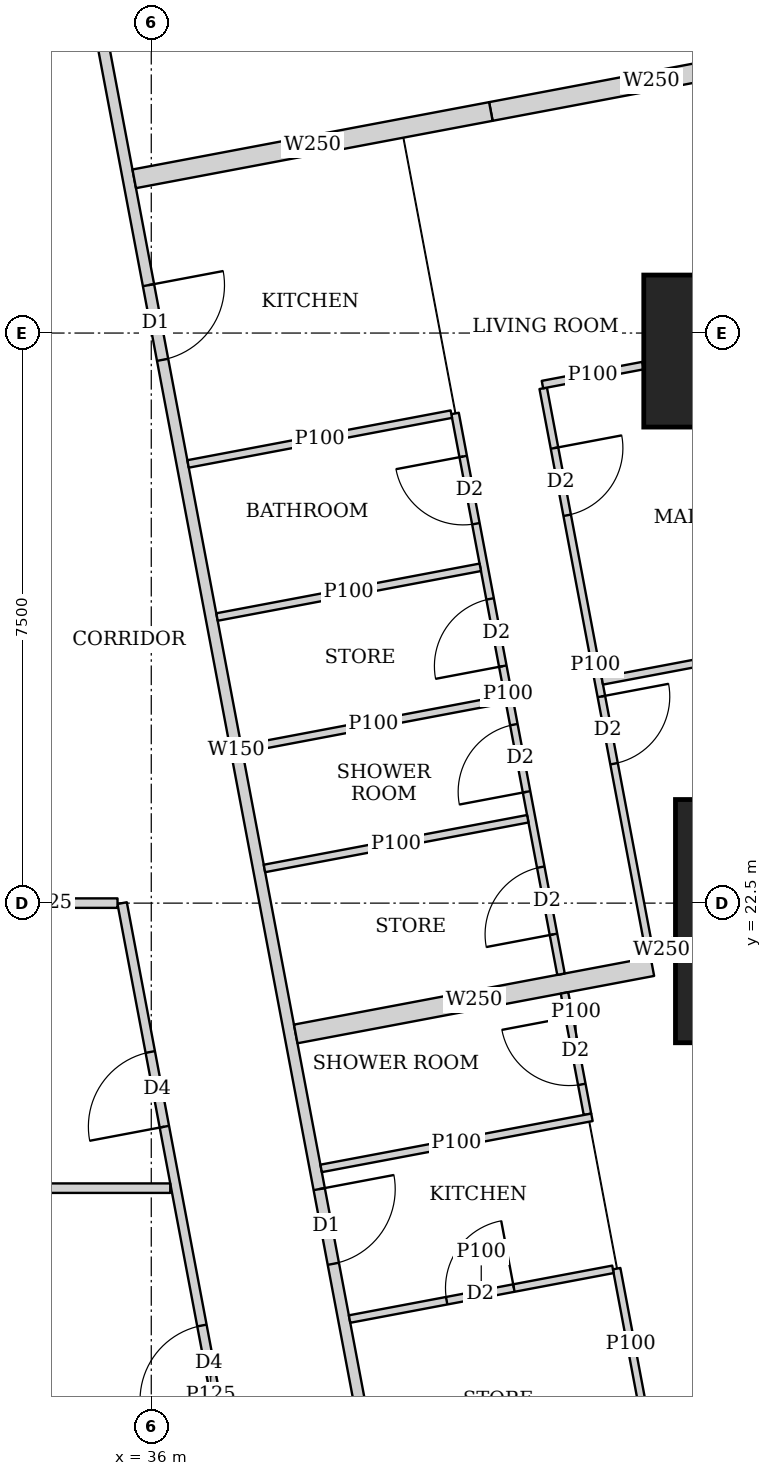
"""IFC4 building model, lengths in metres.
Left out: names, types, materials, properties, quantities, classifications, styles, units other than length and angle.
Written with IfcOpenShell. Run it as: python <this file> out.ifc"""

import sys

from ifc_helpers import new_model, si_unit, direction, frame, frame_2d, origin, origin_2d, place, context, subcontext, project, spatial, rectangle, extrude, element, fill, save


model = new_model("IFC4")
c1 = context("Model", 3, precision=1e-05, world=origin(), true_north=direction((0.0, 1.0)))
c2 = subcontext(c1, "Body", "Model", "MODEL_VIEW")
j1 = project(units=[si_unit("LENGTHUNIT", "METRE"), si_unit("PLANEANGLEUNIT", "RADIAN")], contexts=[c1])
p1 = place(None, origin())
s1 = spatial("IfcSite", under=j1, at=p1, CompositionType="ELEMENT")
p2 = place(p1, origin())
s2 = spatial("IfcBuilding", under=s1, at=p2, CompositionType="ELEMENT")
p3 = place(p2, frame((0.0, 0.0, 255.35)))
s3 = spatial("IfcBuildingStorey", under=s2, at=p3, CompositionType="ELEMENT", Elevation=255.35)
p4 = place(p3, frame((44.697, 22.263, 0.0), z_axis=(0.0, 0.0, 1.0), x_axis=(1.0, 0.0, 0.0)))
e1 = element("IfcColumn", 1, at=p4, inside=s3, PredefinedType="COLUMN", context=c2, shape_type="SweptSolid", body=[
    extrude(rectangle(XDim=3.6, YDim=3.2, at=origin_2d()), origin(), (0.0, 0.0, 1.0), 3.75),
])
p5 = place(p3, frame((43.48, 29.763, 0.0), z_axis=(0.0, 0.0, 1.0), x_axis=(1.0, 0.0, 0.0)))
e2 = element("IfcColumn", 2, at=p5, inside=s3, PredefinedType="COLUMN", context=c2, shape_type="SweptSolid", body=[
    extrude(rectangle(XDim=2.0, YDim=2.0, at=origin_2d()), origin(), (0.0, 0.0, 1.0), 3.75),
])
p6 = place(p3, frame((49.684, 7.832, 0.0), z_axis=(0.0, 0.0, 1.0), x_axis=(-0.185616669694, 0.982622232565, 0.0)))
e3 = element("IfcWall", 3, at=p6, inside=s3, PredefinedType="SOLIDWALL", context=c2, shape_type="SweptSolid", body=[
    extrude(rectangle(XDim=36.0, YDim=0.2, at=frame_2d((18.0, 0.0))), origin(), (0.0, 0.0, 1.0), 3.5),
])
p7 = place(p6, frame((2.518, 0.0, 0.9)))
e4 = element("IfcOpeningElement", 4, at=p7, cuts=e3, PredefinedType="OPENING", context=c2, shape_type="SweptSolid", body=[
    extrude(rectangle(XDim=2.4, YDim=1.5, at=frame_2d((1.2, 0.75))), frame((0.0, 0.11, 0.0), z_axis=(0.0, -1.0, 0.0), x_axis=(1.0, 0.0, 0.0)), (0.0, 0.0, 1.0), 0.22),
])
p8 = place(p6, frame((8.444, 0.0, 0.9)))
e5 = element("IfcOpeningElement", 5, at=p8, cuts=e3, PredefinedType="OPENING", context=c2, shape_type="SweptSolid", body=[
    extrude(rectangle(XDim=1.8, YDim=1.5, at=frame_2d((0.9, 0.75))), frame((0.0, 0.11, 0.0), z_axis=(0.0, -1.0, 0.0), x_axis=(1.0, 0.0, 0.0)), (0.0, 0.0, 1.0), 0.22),
])
p9 = place(p6, frame((12.261, 0.0, 0.9)))
e6 = element("IfcOpeningElement", 6, at=p9, cuts=e3, PredefinedType="OPENING", context=c2, shape_type="SweptSolid", body=[
    extrude(rectangle(XDim=1.8, YDim=1.5, at=frame_2d((0.9, 0.75))), frame((0.0, 0.11, 0.0), z_axis=(0.0, -1.0, 0.0), x_axis=(1.0, 0.0, 0.0)), (0.0, 0.0, 1.0), 0.22),
])
p10 = place(p6, frame((16.078, 0.0, 0.9)))
e7 = element("IfcOpeningElement", 7, at=p10, cuts=e3, PredefinedType="OPENING", context=c2, shape_type="SweptSolid", body=[
    extrude(rectangle(XDim=1.8, YDim=1.5, at=frame_2d((0.9, 0.75))), frame((0.0, 0.11, 0.0), z_axis=(0.0, -1.0, 0.0), x_axis=(1.0, 0.0, 0.0)), (0.0, 0.0, 1.0), 0.22),
])
p11 = place(p6, frame((19.894, 0.0, 0.9)))
e8 = element("IfcOpeningElement", 8, at=p11, cuts=e3, PredefinedType="OPENING", context=c2, shape_type="SweptSolid", body=[
    extrude(rectangle(XDim=1.8, YDim=1.5, at=frame_2d((0.9, 0.75))), frame((0.0, 0.11, 0.0), z_axis=(0.0, -1.0, 0.0), x_axis=(1.0, 0.0, 0.0)), (0.0, 0.0, 1.0), 0.22),
])
p12 = place(p6, frame((23.71, 0.0, 0.9)))
e9 = element("IfcOpeningElement", 9, at=p12, cuts=e3, PredefinedType="OPENING", context=c2, shape_type="SweptSolid", body=[
    extrude(rectangle(XDim=1.8, YDim=1.5, at=frame_2d((0.9, 0.75))), frame((0.0, 0.11, 0.0), z_axis=(0.0, -1.0, 0.0), x_axis=(1.0, 0.0, 0.0)), (0.0, 0.0, 1.0), 0.22),
])
p13 = place(p6, frame((27.526, 0.0, 0.9)))
e10 = element("IfcOpeningElement", 10, at=p13, cuts=e3, PredefinedType="OPENING", context=c2, shape_type="SweptSolid", body=[
    extrude(rectangle(XDim=1.8, YDim=1.5, at=frame_2d((0.9, 0.75))), frame((0.0, 0.11, 0.0), z_axis=(0.0, -1.0, 0.0), x_axis=(1.0, 0.0, 0.0)), (0.0, 0.0, 1.0), 0.22),
])
p14 = place(p6, frame((32.046, 0.0, 0.9)))
e11 = element("IfcOpeningElement", 11, at=p14, cuts=e3, PredefinedType="OPENING", context=c2, shape_type="SweptSolid", body=[
    extrude(rectangle(XDim=1.8, YDim=1.5, at=frame_2d((0.9, 0.75))), frame((0.0, 0.11, 0.0), z_axis=(0.0, -1.0, 0.0), x_axis=(1.0, 0.0, 0.0)), (0.0, 0.0, 1.0), 0.22),
])
p15 = place(p3, frame((33.781, 42.186, 0.0), z_axis=(0.0, 0.0, 1.0), x_axis=(0.185593518645, -0.9826266055, 0.0)))
e12 = element("IfcWall", 12, at=p15, inside=s3, PredefinedType="SOLIDWALL", context=c2, shape_type="SweptSolid", body=[
    extrude(rectangle(XDim=35.961, YDim=0.15, at=frame_2d((17.98, 0.0))), origin(), (0.0, 0.0, 1.0), 2.5),
])
p16 = place(p15, frame((7.183, 0.0, 0.0)))
e13 = element("IfcOpeningElement", 13, at=p16, cuts=e12, PredefinedType="OPENING", context=c2, shape_type="SweptSolid", body=[
    extrude(rectangle(XDim=1.0, YDim=2.1, at=frame_2d((0.5, 1.05))), frame((0.0, 0.085, 0.0), z_axis=(0.0, -1.0, 0.0), x_axis=(1.0, 0.0, 0.0)), (0.0, 0.0, 1.0), 0.17),
])
p17 = place(p15, frame((11.76, 0.0, 0.0)))
e14 = element("IfcOpeningElement", 14, at=p17, cuts=e12, PredefinedType="OPENING", context=c2, shape_type="SweptSolid", body=[
    extrude(rectangle(XDim=1.0, YDim=2.1, at=frame_2d((0.5, 1.05))), frame((0.0, 0.085, 0.0), z_axis=(0.0, -1.0, 0.0), x_axis=(1.0, 0.0, 0.0)), (0.0, 0.0, 1.0), 0.17),
])
p18 = place(p15, frame((23.863, 0.0, 0.0)))
e15 = element("IfcOpeningElement", 15, at=p18, cuts=e12, PredefinedType="OPENING", context=c2, shape_type="SweptSolid", body=[
    extrude(rectangle(XDim=1.0, YDim=2.1, at=frame_2d((0.5, 1.05))), frame((0.0, 0.085, 0.0), z_axis=(0.0, -1.0, 0.0), x_axis=(1.0, 0.0, 0.0)), (0.0, 0.0, 1.0), 0.17),
])
p19 = place(p15, frame((30.502, 0.0, 0.0)))
e16 = element("IfcOpeningElement", 16, at=p19, cuts=e12, PredefinedType="OPENING", context=c2, shape_type="SweptSolid", body=[
    extrude(rectangle(XDim=1.0, YDim=2.1, at=frame_2d((0.5, 1.05))), frame((0.0, 0.085, 0.0), z_axis=(0.0, -1.0, 0.0), x_axis=(1.0, 0.0, 0.0)), (0.0, 0.0, 1.0), 0.17),
])
p20 = place(p3, frame((41.157, 29.273, 0.0), z_axis=(0.0, 0.0, 1.0), x_axis=(0.18542464283, -0.982658486877, 0.0)))
e17 = element("IfcWall", 17, at=p20, inside=s3, PredefinedType="PARTITIONING", context=c2, shape_type="SweptSolid", body=[
    extrude(rectangle(XDim=7.421, YDim=0.1, at=frame_2d((3.71, 0.0))), origin(), (0.0, 0.0, 1.0), 2.5),
])
p21 = place(p20, frame((0.8, 0.0, 0.0)))
e18 = element("IfcOpeningElement", 18, at=p21, cuts=e17, PredefinedType="OPENING", context=c2, shape_type="SweptSolid", body=[
    extrude(rectangle(XDim=0.9, YDim=2.1, at=frame_2d((0.45, 1.05))), frame((0.0, 0.06, 0.0), z_axis=(0.0, -1.0, 0.0), x_axis=(1.0, 0.0, 0.0)), (0.0, 0.0, 1.0), 0.12),
])
p22 = place(p20, frame((4.126, 0.0, 0.0)))
e19 = element("IfcOpeningElement", 19, at=p22, cuts=e17, PredefinedType="OPENING", context=c2, shape_type="SweptSolid", body=[
    extrude(rectangle(XDim=0.9, YDim=2.1, at=frame_2d((0.45, 1.05))), frame((0.0, 0.06, 0.0), z_axis=(0.0, -1.0, 0.0), x_axis=(1.0, 0.0, 0.0)), (0.0, 0.0, 1.0), 0.12),
])
p23 = place(p3, frame((39.997, 28.942, 0.0), z_axis=(0.0, 0.0, 1.0), x_axis=(0.185686318797, -0.982609073341, 0.0)))
e20 = element("IfcWall", 20, at=p23, inside=s3, PredefinedType="PARTITIONING", context=c2, shape_type="SweptSolid", body=[
    extrude(rectangle(XDim=7.508, YDim=0.1, at=frame_2d((3.754, 0.0))), origin(), (0.0, 0.0, 1.0), 2.5),
])
p24 = place(p23, frame((0.576, 0.0, 0.0)))
e21 = element("IfcOpeningElement", 21, at=p24, cuts=e20, PredefinedType="OPENING", context=c2, shape_type="SweptSolid", body=[
    extrude(rectangle(XDim=0.9, YDim=2.1, at=frame_2d((0.45, 1.05))), frame((0.0, 0.06, 0.0), z_axis=(0.0, -1.0, 0.0), x_axis=(1.0, 0.0, 0.0)), (0.0, 0.0, 1.0), 0.12),
])
p25 = place(p23, frame((4.166, 0.0, 0.0)))
e22 = element("IfcOpeningElement", 22, at=p25, cuts=e20, PredefinedType="OPENING", context=c2, shape_type="SweptSolid", body=[
    extrude(rectangle(XDim=0.9, YDim=2.1, at=frame_2d((0.45, 1.05))), frame((0.0, 0.06, 0.0), z_axis=(0.0, -1.0, 0.0), x_axis=(1.0, 0.0, 0.0)), (0.0, 0.0, 1.0), 0.12),
])
p26 = place(p23, frame((2.483, 0.0, 0.0)))
e23 = element("IfcOpeningElement", 23, at=p26, cuts=e20, PredefinedType="OPENING", context=c2, shape_type="SweptSolid", body=[
    extrude(rectangle(XDim=0.9, YDim=2.1, at=frame_2d((0.45, 1.05))), frame((0.0, 0.06, 0.0), z_axis=(0.0, -1.0, 0.0), x_axis=(1.0, 0.0, 0.0)), (0.0, 0.0, 1.0), 0.12),
])
p27 = place(p23, frame((6.074, 0.0, 0.0)))
e24 = element("IfcOpeningElement", 24, at=p27, cuts=e20, PredefinedType="OPENING", context=c2, shape_type="SweptSolid", body=[
    extrude(rectangle(XDim=0.9, YDim=2.1, at=frame_2d((0.45, 1.05))), frame((0.0, 0.06, 0.0), z_axis=(0.0, -1.0, 0.0), x_axis=(1.0, 0.0, 0.0)), (0.0, 0.0, 1.0), 0.12),
])
p28 = place(p3, frame((42.47, 29.572, 0.0), z_axis=(0.0, 0.0, 1.0), x_axis=(-0.982610503289, -0.185678751683, 0.0)))
e25 = element("IfcWall", 25, at=p28, inside=s3, PredefinedType="PARTITIONING", context=c2, shape_type="SweptSolid", body=[
    extrude(rectangle(XDim=1.346, YDim=0.1, at=frame_2d((0.673, 0.0))), origin(), (0.0, 0.0, 1.0), 2.5),
])
p29 = place(p3, frame((46.11, 26.213, 0.0), z_axis=(0.0, 0.0, 1.0), x_axis=(-0.982623519589, -0.185609856287, 0.0)))
e26 = element("IfcWall", 26, at=p29, inside=s3, PredefinedType="PARTITIONING", context=c2, shape_type="SweptSolid", body=[
    extrude(rectangle(XDim=4.25, YDim=0.1, at=frame_2d((2.125, 0.0))), origin(), (0.0, 0.0, 1.0), 2.5),
])
p30 = place(p3, frame((39.948, 28.933, 0.0), z_axis=(0.0, 0.0, 1.0), x_axis=(-0.982588017646, -0.185797706064, 0.0)))
e27 = element("IfcWall", 27, at=p30, inside=s3, PredefinedType="PARTITIONING", context=c2, shape_type="SweptSolid", body=[
    extrude(rectangle(XDim=3.525, YDim=0.1, at=frame_2d((1.763, 0.0))), origin(), (0.0, 0.0, 1.0), 3.5),
])
p31 = place(p3, frame((40.656, 25.183, 0.0), z_axis=(0.0, 0.0, 1.0), x_axis=(-0.982576058723, -0.185860939478, 0.0)))
e28 = element("IfcWall", 28, at=p31, inside=s3, PredefinedType="PARTITIONING", context=c2, shape_type="SweptSolid", body=[
    extrude(rectangle(XDim=3.524, YDim=0.1, at=frame_2d((1.762, 0.0))), origin(), (0.0, 0.0, 1.0), 3.5),
])
p32 = place(p3, frame((40.329, 26.918, 0.0), z_axis=(0.0, 0.0, 1.0), x_axis=(-0.982638553676, -0.185530247748, 0.0)))
e29 = element("IfcWall", 29, at=p32, inside=s3, PredefinedType="PARTITIONING", context=c2, shape_type="SweptSolid", body=[
    extrude(rectangle(XDim=3.525, YDim=0.1, at=frame_2d((1.763, 0.0))), origin(), (0.0, 0.0, 1.0), 3.5),
])
p33 = place(p3, frame((40.954, 23.61, 0.0), z_axis=(0.0, 0.0, 1.0), x_axis=(-0.98264808502, -0.18547975902, 0.0)))
e30 = element("IfcWall", 30, at=p33, inside=s3, PredefinedType="PARTITIONING", context=c2, shape_type="SweptSolid", body=[
    extrude(rectangle(XDim=3.526, YDim=0.1, at=frame_2d((1.763, 0.0))), origin(), (0.0, 0.0, 1.0), 2.5),
])
p34 = place(p3, frame((44.693, 33.713, 0.0), z_axis=(0.0, 0.0, 1.0), x_axis=(-0.982633535512, -0.185556823879, 0.0)))
e31 = element("IfcWall", 31, at=p34, inside=s3, PredefinedType="SOLIDWALL", context=c2, shape_type="SweptSolid", body=[
    extrude(rectangle(XDim=4.3, YDim=0.25, at=frame_2d((2.15, 0.0))), origin(), (0.0, 0.0, 1.0), 2.5),
])
p35 = place(p3, frame((40.468, 32.915, 0.0), z_axis=(0.0, 0.0, 1.0), x_axis=(-0.982635807605, -0.185544791394, 0.0)))
e32 = element("IfcWall", 32, at=p35, inside=s3, PredefinedType="SOLIDWALL", context=c2, shape_type="SweptSolid", body=[
    extrude(rectangle(XDim=4.775, YDim=0.25, at=frame_2d((2.388, 0.0))), origin(), (0.0, 0.0, 1.0), 3.5),
])
p36 = place(p3, frame((41.437, 21.319, 0.0), z_axis=(0.0, 0.0, 1.0), x_axis=(0.185793689589, -0.982588777113, 0.0)))
e33 = element("IfcWall", 33, at=p36, inside=s3, PredefinedType="PARTITIONING", context=c2, shape_type="SweptSolid", body=[
    extrude(rectangle(XDim=1.625, YDim=0.1, at=frame_2d((0.813, 0.0))), origin(), (0.0, 0.0, 1.0), 3.5),
])
p37 = place(p36, frame((0.325, 0.0, 0.0)))
e34 = element("IfcOpeningElement", 34, at=p37, cuts=e33, PredefinedType="OPENING", context=c2, shape_type="SweptSolid", body=[
    extrude(rectangle(XDim=0.9, YDim=2.1, at=frame_2d((0.45, 1.05))), frame((0.0, 0.06, 0.0), z_axis=(0.0, -1.0, 0.0), x_axis=(1.0, 0.0, 0.0)), (0.0, 0.0, 1.0), 0.12),
])
p38 = place(p3, frame((41.798, 19.682, 0.0), z_axis=(0.0, 0.0, 1.0), x_axis=(-0.982681091817, -0.185304807776, 0.0)))
e35 = element("IfcWall", 35, at=p38, inside=s3, PredefinedType="PARTITIONING", context=c2, shape_type="SweptSolid", body=[
    extrude(rectangle(XDim=3.626, YDim=0.1, at=frame_2d((1.813, 0.0))), origin(), (0.0, 0.0, 1.0), 3.5),
])
p39 = place(p3, frame((42.123, 17.691, 0.0), z_axis=(0.0, 0.0, 1.0), x_axis=(0.185183804812, -0.98270390171, 0.0)))
e36 = element("IfcWall", 36, at=p39, inside=s3, PredefinedType="PARTITIONING", context=c2, shape_type="SweptSolid", body=[
    extrude(rectangle(XDim=2.025, YDim=0.1, at=frame_2d((1.012, 0.0))), origin(), (0.0, 0.0, 1.0), 3.5),
])
p40 = place(p3, frame((42.074, 17.682, 0.0), z_axis=(0.0, 0.0, 1.0), x_axis=(-0.982660701716, -0.185412904897, 0.0)))
e37 = element("IfcWall", 37, at=p40, inside=s3, PredefinedType="PARTITIONING", context=c2, shape_type="SweptSolid", body=[
    extrude(rectangle(XDim=3.526, YDim=0.1, at=frame_2d((1.763, 0.0))), origin(), (0.0, 0.0, 1.0), 3.5),
])
p41 = place(p40, frame((1.326, 0.0, 0.0)))
e38 = element("IfcOpeningElement", 38, at=p41, cuts=e37, PredefinedType="OPENING", context=c2, shape_type="SweptSolid", body=[
    extrude(rectangle(XDim=0.9, YDim=2.1, at=frame_2d((0.45, 1.05))), frame((0.0, 0.06, 0.0), z_axis=(0.0, -1.0, 0.0), x_axis=(1.0, 0.0, 0.0)), (0.0, 0.0, 1.0), 0.12),
])
p42 = place(p3, frame((42.873, 21.918, 0.0), z_axis=(0.0, 0.0, 1.0), x_axis=(-0.982431406936, -0.186624035603, 0.0)))
e39 = element("IfcWall", 39, at=p42, inside=s3, PredefinedType="SOLIDWALL", context=c2, shape_type="SweptSolid", body=[
    extrude(rectangle(XDim=0.322, YDim=0.25, at=frame_2d((0.161, 0.0))), origin(), (0.0, 0.0, 1.0), 2.5),
])
p43 = place(p3, frame((42.593, 21.665, 0.0), z_axis=(0.0, 0.0, 1.0), x_axis=(-0.982635807605, -0.185544791394, 0.0)))
e40 = element("IfcWall", 40, at=p43, inside=s3, PredefinedType="SOLIDWALL", context=c2, shape_type="SweptSolid", body=[
    extrude(rectangle(XDim=4.775, YDim=0.25, at=frame_2d((2.388, 0.0))), origin(), (0.0, 0.0, 1.0), 2.5),
])
p44 = place(p3, frame((37.947, 10.163, 0.0), z_axis=(0.0, 0.0, 1.0), x_axis=(-0.185589250699, 0.982627411599, 0.0)))
e41 = element("IfcWall", 41, at=p44, inside=s3, PredefinedType="PARTITIONING", context=c2, shape_type="SweptSolid", body=[
    extrude(rectangle(XDim=12.555, YDim=0.125, at=frame_2d((6.277, 0.0))), origin(), (0.0, 0.0, 1.0), 2.5),
])
p45 = place(p44, frame((0.708, 0.0, 0.0)))
e42 = element("IfcOpeningElement", 42, at=p45, cuts=e41, PredefinedType="OPENING", context=c2, shape_type="SweptSolid", body=[
    extrude(rectangle(XDim=1.0, YDim=2.1, at=frame_2d((0.5, 1.05))), frame((0.0, 0.073, 0.0), z_axis=(0.0, -1.0, 0.0), x_axis=(1.0, 0.0, 0.0)), (0.0, 0.0, 1.0), 0.145),
])
p46 = place(p44, frame((5.9, 0.0, 0.0)))
e43 = element("IfcOpeningElement", 43, at=p46, cuts=e41, PredefinedType="OPENING", context=c2, shape_type="SweptSolid", body=[
    extrude(rectangle(XDim=1.0, YDim=2.1, at=frame_2d((0.5, 1.05))), frame((0.0, 0.073, 0.0), z_axis=(0.0, -1.0, 0.0), x_axis=(1.0, 0.0, 0.0)), (0.0, 0.0, 1.0), 0.145),
])
p47 = place(p44, frame((9.562, 0.0, 0.0)))
e44 = element("IfcOpeningElement", 44, at=p47, cuts=e41, PredefinedType="OPENING", context=c2, shape_type="SweptSolid", body=[
    extrude(rectangle(XDim=1.0, YDim=2.1, at=frame_2d((0.5, 1.05))), frame((0.0, 0.073, 0.0), z_axis=(0.0, -1.0, 0.0), x_axis=(1.0, 0.0, 0.0)), (0.0, 0.0, 1.0), 0.145),
])
p48 = place(p3, frame((29.25, 18.75, 0.0), z_axis=(0.0, 0.0, 1.0), x_axis=(1.0, 0.0, 0.0)))
e45 = element("IfcWall", 45, at=p48, inside=s3, PredefinedType="PARTITIONING", context=c2, shape_type="SweptSolid", body=[
    extrude(rectangle(XDim=7.0, YDim=0.125, at=frame_2d((3.5, 0.0))), origin(), (0.0, 0.0, 1.0), 3.5),
])
p49 = place(p3, frame((33.701, 22.5, 0.0), z_axis=(0.0, 0.0, 1.0), x_axis=(1.0, 0.0, 0.0)))
e46 = element("IfcWall", 46, at=p49, inside=s3, PredefinedType="PARTITIONING", context=c2, shape_type="SweptSolid", body=[
    extrude(rectangle(XDim=1.855, YDim=0.125, at=frame_2d((0.927, 0.0))), origin(), (0.0, 0.0, 1.0), 2.5),
])
p50 = place(p21, origin())
e47 = element("IfcDoor", 47, at=p50, inside=s3, OperationType="SINGLE_SWING_LEFT", PredefinedType="DOOR", context=c2, shape_type="SweptSolid", body=[
    extrude(rectangle(XDim=0.9, YDim=2.1, at=frame_2d((0.45, 1.05))), frame((0.0, 0.025, 0.0), z_axis=(0.0, -1.0, 0.0), x_axis=(1.0, 0.0, 0.0)), (0.0, 0.0, 1.0), 0.05),
])
fill(e18, e47)
p51 = place(p22, origin())
e48 = element("IfcDoor", 48, at=p51, inside=s3, OperationType="SINGLE_SWING_LEFT", PredefinedType="DOOR", context=c2, shape_type="SweptSolid", body=[
    extrude(rectangle(XDim=0.9, YDim=2.1, at=frame_2d((0.45, 1.05))), frame((0.0, 0.025, 0.0), z_axis=(0.0, -1.0, 0.0), x_axis=(1.0, 0.0, 0.0)), (0.0, 0.0, 1.0), 0.05),
])
fill(e19, e48)
p52 = place(p24, origin())
e49 = element("IfcDoor", 49, at=p52, inside=s3, OperationType="SINGLE_SWING_RIGHT", PredefinedType="DOOR", context=c2, shape_type="SweptSolid", body=[
    extrude(rectangle(XDim=0.9, YDim=2.1, at=frame_2d((0.45, 1.05))), frame((0.0, 0.025, 0.0), z_axis=(0.0, -1.0, 0.0), x_axis=(1.0, 0.0, 0.0)), (0.0, 0.0, 1.0), 0.05),
])
fill(e21, e49)
p53 = place(p25, origin())
e50 = element("IfcDoor", 50, at=p53, inside=s3, OperationType="SINGLE_SWING_LEFT", PredefinedType="DOOR", context=c2, shape_type="SweptSolid", body=[
    extrude(rectangle(XDim=0.9, YDim=2.1, at=frame_2d((0.45, 1.05))), frame((0.0, 0.025, 0.0), z_axis=(0.0, -1.0, 0.0), x_axis=(1.0, 0.0, 0.0)), (0.0, 0.0, 1.0), 0.05),
])
fill(e22, e50)
p54 = place(p26, origin())
e51 = element("IfcDoor", 51, at=p54, inside=s3, OperationType="SINGLE_SWING_LEFT", PredefinedType="DOOR", context=c2, shape_type="SweptSolid", body=[
    extrude(rectangle(XDim=0.9, YDim=2.1, at=frame_2d((0.45, 1.05))), frame((0.0, 0.025, 0.0), z_axis=(0.0, -1.0, 0.0), x_axis=(1.0, 0.0, 0.0)), (0.0, 0.0, 1.0), 0.05),
])
fill(e23, e51)
p55 = place(p27, origin())
e52 = element("IfcDoor", 52, at=p55, inside=s3, OperationType="SINGLE_SWING_LEFT", PredefinedType="DOOR", context=c2, shape_type="SweptSolid", body=[
    extrude(rectangle(XDim=0.9, YDim=2.1, at=frame_2d((0.45, 1.05))), frame((0.0, 0.025, 0.0), z_axis=(0.0, -1.0, 0.0), x_axis=(1.0, 0.0, 0.0)), (0.0, 0.0, 1.0), 0.05),
])
fill(e24, e52)
p56 = place(p17, origin())
e53 = element("IfcDoor", 53, at=p56, inside=s3, OperationType="SINGLE_SWING_LEFT", PredefinedType="DOOR", context=c2, shape_type="SweptSolid", body=[
    extrude(rectangle(XDim=1.0, YDim=2.1, at=frame_2d((0.5, 1.05))), frame((0.0, 0.025, 0.0), z_axis=(0.0, -1.0, 0.0), x_axis=(1.0, 0.0, 0.0)), (0.0, 0.0, 1.0), 0.05),
])
fill(e14, e53)
p57 = place(p37, origin())
e54 = element("IfcDoor", 54, at=p57, inside=s3, OperationType="SINGLE_SWING_RIGHT", PredefinedType="DOOR", context=c2, shape_type="SweptSolid", body=[
    extrude(rectangle(XDim=0.9, YDim=2.1, at=frame_2d((0.45, 1.05))), frame((0.0, 0.025, 0.0), z_axis=(0.0, -1.0, 0.0), x_axis=(1.0, 0.0, 0.0)), (0.0, 0.0, 1.0), 0.05),
])
fill(e34, e54)
p58 = place(p18, origin())
e55 = element("IfcDoor", 55, at=p58, inside=s3, OperationType="SINGLE_SWING_LEFT", PredefinedType="DOOR", context=c2, shape_type="SweptSolid", body=[
    extrude(rectangle(XDim=1.0, YDim=2.1, at=frame_2d((0.5, 1.05))), frame((0.0, 0.025, 0.0), z_axis=(0.0, -1.0, 0.0), x_axis=(1.0, 0.0, 0.0)), (0.0, 0.0, 1.0), 0.05),
])
fill(e15, e55)
p59 = place(p41, origin())
e56 = element("IfcDoor", 56, at=p59, inside=s3, OperationType="SINGLE_SWING_RIGHT", PredefinedType="DOOR", context=c2, shape_type="SweptSolid", body=[
    extrude(rectangle(XDim=0.9, YDim=2.1, at=frame_2d((0.45, 1.05))), frame((0.0, 0.025, 0.0), z_axis=(0.0, -1.0, 0.0), x_axis=(1.0, 0.0, 0.0)), (0.0, 0.0, 1.0), 0.05),
])
fill(e38, e56)
p60 = place(p46, origin())
e57 = element("IfcDoor", 57, at=p60, inside=s3, OperationType="SINGLE_SWING_LEFT", PredefinedType="DOOR", context=c2, shape_type="SweptSolid", body=[
    extrude(rectangle(XDim=1.0, YDim=2.1, at=frame_2d((0.5, 1.05))), frame((0.0, 0.025, 0.0), z_axis=(0.0, -1.0, 0.0), x_axis=(1.0, 0.0, 0.0)), (0.0, 0.0, 1.0), 0.05),
])
fill(e43, e57)
p61 = place(p47, origin())
e58 = element("IfcDoor", 58, at=p61, inside=s3, OperationType="SINGLE_SWING_LEFT", PredefinedType="DOOR", context=c2, shape_type="SweptSolid", body=[
    extrude(rectangle(XDim=1.0, YDim=2.1, at=frame_2d((0.5, 1.05))), frame((0.0, 0.025, 0.0), z_axis=(0.0, -1.0, 0.0), x_axis=(1.0, 0.0, 0.0)), (0.0, 0.0, 1.0), 0.05),
])
fill(e44, e58)
save(model, sys.argv[1])
